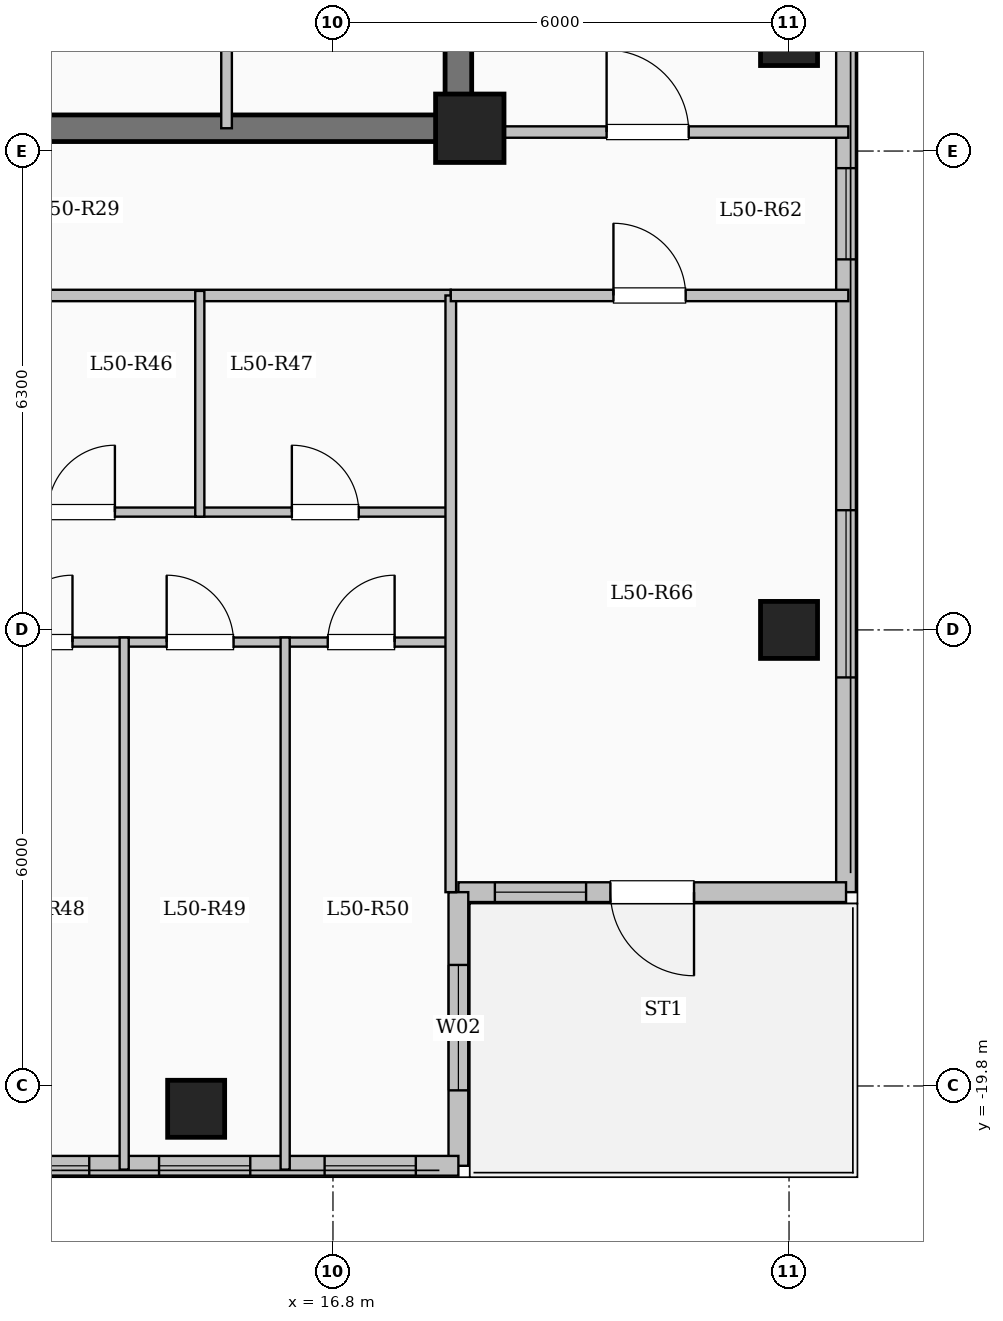
"""IFC4 building model, lengths in metres.
Left out: names, types, materials, properties, quantities, classifications, styles, units other than length and angle.
Written with IfcOpenShell. Run it as: python <this file> out.ifc"""

import sys

from ifc_helpers import new_model, si_unit, direction, frame, frame_2d, origin, origin_2d, place, context, subcontext, project, spatial, rectangle, extrude, element, fill, save


model = new_model("IFC4")
c1 = context("Model", 3, precision=1e-05, world=origin(), true_north=direction((0.0, 1.0)))
c2 = subcontext(c1, "Body", "Model", "MODEL_VIEW")
j1 = project(units=[si_unit("LENGTHUNIT", "METRE"), si_unit("PLANEANGLEUNIT", "RADIAN")], contexts=[c1])
p1 = place(None, origin())
s1 = spatial("IfcSite", under=j1, at=p1, CompositionType="ELEMENT")
p2 = place(p1, origin())
s2 = spatial("IfcBuilding", under=s1, at=p2, CompositionType="ELEMENT")
p3 = place(p2, frame((0.0, 0.0, 186.9)))
s3 = spatial("IfcBuildingStorey", under=s2, at=p3, CompositionType="ELEMENT", Elevation=186.9)
p4 = place(p3, frame((18.6, -7.2, 0.0), z_axis=(0.0, 0.0, 1.0), x_axis=(1.0, 0.0, 0.0)))
e1 = element("IfcColumn", 1, at=p4, inside=s3, PredefinedType="COLUMN", context=c2, shape_type="SweptSolid", body=[
    extrude(rectangle(XDim=0.9, YDim=0.9, at=origin_2d()), origin(), (0.0, 0.0, 1.0), 3.35),
])
for number, where, z_axis, x_axis in (
    (2, (15.0, -20.1, 0.0), (0.0, 0.0, 1.0), (1.0, 0.0, 0.0)),
    (3, (22.8, -13.8, 0.0), (0.0, 0.0, 1.0), (1.0, 0.0, 0.0)),
    (4, (22.8, -6.0, 0.0), (0.0, 0.0, 1.0), (1.0, 0.0, 0.0)),
):
    element("IfcColumn", number, at=place(p3, frame(where, z_axis=z_axis, x_axis=x_axis)), inside=s3, PredefinedType="COLUMN", context=c2, shape_type="SweptSolid", body=[
        extrude(rectangle(XDim=0.75, YDim=0.75, at=origin_2d()), origin(), (0.0, 0.0, 1.0), 3.35),
    ])
p5 = place(p3, frame((23.55, 17.25, 0.0), z_axis=(0.0, 0.0, 1.0), x_axis=(0.0, -1.0, 0.0)))
e5 = element("IfcWall", 5, at=p5, inside=s3, PredefinedType="SOLIDWALL", context=c2, shape_type="SweptSolid", body=[
    extrude(rectangle(XDim=34.5, YDim=0.26, at=frame_2d((17.25, 0.0))), origin(), (0.0, 0.0, 1.0), 3.1),
])
p6 = place(p5, frame((1.375, 0.0, 0.9)))
e6 = element("IfcOpeningElement", 6, at=p6, cuts=e5, PredefinedType="OPENING", context=c2, shape_type="SweptSolid", body=[
    extrude(rectangle(XDim=2.0, YDim=1.7, at=frame_2d((1.0, 0.85))), frame((0.0, 0.14, 0.0), z_axis=(0.0, -1.0, 0.0), x_axis=(1.0, 0.0, 0.0)), (0.0, 0.0, 1.0), 0.28),
])
p7 = place(p5, frame((5.125, 0.0, 0.95)))
e7 = element("IfcOpeningElement", 7, at=p7, cuts=e5, PredefinedType="OPENING", context=c2, shape_type="SweptSolid", body=[
    extrude(rectangle(XDim=1.0, YDim=1.5, at=frame_2d((0.5, 0.75))), frame((0.0, 0.14, 0.0), z_axis=(0.0, -1.0, 0.0), x_axis=(1.0, 0.0, 0.0)), (0.0, 0.0, 1.0), 0.28),
])
p8 = place(p5, frame((14.5, 0.0, 0.9)))
e8 = element("IfcOpeningElement", 8, at=p8, cuts=e5, PredefinedType="OPENING", context=c2, shape_type="SweptSolid", body=[
    extrude(rectangle(XDim=2.0, YDim=1.7, at=frame_2d((1.0, 0.85))), frame((0.0, 0.14, 0.0), z_axis=(0.0, -1.0, 0.0), x_axis=(1.0, 0.0, 0.0)), (0.0, 0.0, 1.0), 0.28),
])
p9 = place(p5, frame((24.975, 0.0, 0.95)))
e9 = element("IfcOpeningElement", 9, at=p9, cuts=e5, PredefinedType="OPENING", context=c2, shape_type="SweptSolid", body=[
    extrude(rectangle(XDim=1.2, YDim=1.5, at=frame_2d((0.6, 0.75))), frame((0.0, 0.14, 0.0), z_axis=(0.0, -1.0, 0.0), x_axis=(1.0, 0.0, 0.0)), (0.0, 0.0, 1.0), 0.28),
])
p10 = place(p5, frame((29.475, 0.0, 0.9)))
e10 = element("IfcOpeningElement", 10, at=p10, cuts=e5, PredefinedType="OPENING", context=c2, shape_type="SweptSolid", body=[
    extrude(rectangle(XDim=2.2, YDim=1.75, at=frame_2d((1.1, 0.875))), frame((0.0, 0.14, 0.0), z_axis=(0.0, -1.0, 0.0), x_axis=(1.0, 0.0, 0.0)), (0.0, 0.0, 1.0), 0.28),
])
p11 = place(p3, frame((23.55, -17.25, 0.0), z_axis=(0.0, 0.0, 1.0), x_axis=(-1.0, 0.0, 0.0)))
e11 = element("IfcWall", 11, at=p11, inside=s3, PredefinedType="SOLIDWALL", context=c2, shape_type="SweptSolid", body=[
    extrude(rectangle(XDim=5.1, YDim=0.26, at=frame_2d((2.55, 0.0))), origin(), (0.0, 0.0, 1.0), 3.1),
])
p12 = place(p11, frame((2.0, 0.0, 0.0)))
e12 = element("IfcOpeningElement", 12, at=p12, cuts=e11, PredefinedType="OPENING", context=c2, shape_type="SweptSolid", body=[
    extrude(rectangle(XDim=1.1, YDim=2.2, at=frame_2d((0.55, 1.1))), frame((0.0, 0.14, 0.0), z_axis=(0.0, -1.0, 0.0), x_axis=(1.0, 0.0, 0.0)), (0.0, 0.0, 1.0), 0.28),
])
p13 = place(p11, frame((3.42, 0.0, 0.95)))
e13 = element("IfcOpeningElement", 13, at=p13, cuts=e11, PredefinedType="OPENING", context=c2, shape_type="SweptSolid", body=[
    extrude(rectangle(XDim=1.2, YDim=1.5, at=frame_2d((0.6, 0.75))), frame((0.0, 0.14, 0.0), z_axis=(0.0, -1.0, 0.0), x_axis=(1.0, 0.0, 0.0)), (0.0, 0.0, 1.0), 0.28),
])
p14 = place(p3, frame((18.45, -17.25, 0.0), z_axis=(0.0, 0.0, 1.0), x_axis=(0.0, -1.0, 0.0)))
e14 = element("IfcWall", 14, at=p14, inside=s3, PredefinedType="SOLIDWALL", context=c2, shape_type="SweptSolid", body=[
    extrude(rectangle(XDim=3.6, YDim=0.26, at=frame_2d((1.8, 0.0))), origin(), (0.0, 0.0, 1.0), 3.1),
])
p15 = place(p14, frame((0.958, 0.0, 0.9)))
e15 = element("IfcOpeningElement", 15, at=p15, cuts=e14, PredefinedType="OPENING", context=c2, shape_type="SweptSolid", body=[
    extrude(rectangle(XDim=1.65, YDim=1.6, at=frame_2d((0.825, 0.8))), frame((0.0, 0.14, 0.0), z_axis=(0.0, -1.0, 0.0), x_axis=(1.0, 0.0, 0.0)), (0.0, 0.0, 1.0), 0.28),
])
p16 = place(p3, frame((18.45, -20.85, 0.0), z_axis=(0.0, 0.0, 1.0), x_axis=(-1.0, 0.0, 0.0)))
e16 = element("IfcWall", 16, at=p16, inside=s3, PredefinedType="SOLIDWALL", context=c2, shape_type="SweptSolid", body=[
    extrude(rectangle(XDim=11.1, YDim=0.26, at=frame_2d((5.55, 0.0))), origin(), (0.0, 0.0, 1.0), 3.1),
])
p17 = place(p16, frame((0.56, 0.0, 0.95)))
e17 = element("IfcOpeningElement", 17, at=p17, cuts=e16, PredefinedType="OPENING", context=c2, shape_type="SweptSolid", body=[
    extrude(rectangle(XDim=1.2, YDim=1.5, at=frame_2d((0.6, 0.75))), frame((0.0, 0.14, 0.0), z_axis=(0.0, -1.0, 0.0), x_axis=(1.0, 0.0, 0.0)), (0.0, 0.0, 1.0), 0.28),
])
p18 = place(p16, frame((2.738, 0.0, 0.95)))
e18 = element("IfcOpeningElement", 18, at=p18, cuts=e16, PredefinedType="OPENING", context=c2, shape_type="SweptSolid", body=[
    extrude(rectangle(XDim=1.2, YDim=1.5, at=frame_2d((0.6, 0.75))), frame((0.0, 0.14, 0.0), z_axis=(0.0, -1.0, 0.0), x_axis=(1.0, 0.0, 0.0)), (0.0, 0.0, 1.0), 0.28),
])
p19 = place(p16, frame((4.856, 0.0, 0.95)))
e19 = element("IfcOpeningElement", 19, at=p19, cuts=e16, PredefinedType="OPENING", context=c2, shape_type="SweptSolid", body=[
    extrude(rectangle(XDim=1.2, YDim=1.5, at=frame_2d((0.6, 0.75))), frame((0.0, 0.14, 0.0), z_axis=(0.0, -1.0, 0.0), x_axis=(1.0, 0.0, 0.0)), (0.0, 0.0, 1.0), 0.28),
])
p20 = place(p16, frame((7.362, 0.0, 0.9)))
e20 = element("IfcOpeningElement", 20, at=p20, cuts=e16, PredefinedType="OPENING", context=c2, shape_type="SweptSolid", body=[
    extrude(rectangle(XDim=1.65, YDim=1.6, at=frame_2d((0.825, 0.8))), frame((0.0, 0.14, 0.0), z_axis=(0.0, -1.0, 0.0), x_axis=(1.0, 0.0, 0.0)), (0.0, 0.0, 1.0), 0.28),
])
p21 = place(p16, frame((10.103, 0.0, 0.95)))
e21 = element("IfcOpeningElement", 21, at=p21, cuts=e16, PredefinedType="OPENING", context=c2, shape_type="SweptSolid", body=[
    extrude(rectangle(XDim=0.85, YDim=1.5, at=frame_2d((0.425, 0.75))), frame((0.0, 0.14, 0.0), z_axis=(0.0, -1.0, 0.0), x_axis=(1.0, 0.0, 0.0)), (0.0, 0.0, 1.0), 0.28),
])
p22 = place(p3, frame((18.45, -7.375, 0.0), z_axis=(0.0, 0.0, 1.0), x_axis=(0.0, 1.0, 0.0)))
e22 = element("IfcWall", 22, at=p22, inside=s3, PredefinedType="SHEAR", context=c2, shape_type="SweptSolid", body=[
    extrude(rectangle(XDim=14.05, YDim=0.35, at=frame_2d((7.025, 0.0))), origin(), (0.0, 0.0, 1.0), 3.35),
])
p23 = place(p3, frame((12.625, -7.2, 0.0), z_axis=(0.0, 0.0, 1.0), x_axis=(1.0, 0.0, 0.0)))
e23 = element("IfcWall", 23, at=p23, inside=s3, PredefinedType="SHEAR", context=c2, shape_type="SweptSolid", body=[
    extrude(rectangle(XDim=6.0, YDim=0.35, at=frame_2d((3.0, 0.0))), origin(), (0.0, 0.0, 1.0), 3.35),
])
p24 = place(p3, frame((15.4, -7.2, 0.0), z_axis=(0.0, 0.0, 1.0), x_axis=(0.0, 1.0, 0.0)))
e24 = element("IfcWall", 24, at=p24, inside=s3, PredefinedType="PARTITIONING", context=c2, shape_type="SweptSolid", body=[
    extrude(rectangle(XDim=10.45, YDim=0.14, at=frame_2d((5.225, 0.0))), origin(), (0.0, 0.0, 1.0), 3.1),
])
p25 = place(p24, frame((9.25, 0.0, 0.0)))
e25 = element("IfcOpeningElement", 25, at=p25, cuts=e24, PredefinedType="OPENING", context=c2, shape_type="SweptSolid", body=[
    extrude(rectangle(XDim=0.9, YDim=2.08, at=frame_2d((0.45, 1.04))), frame((0.0, 0.08, 0.0), z_axis=(0.0, -1.0, 0.0), x_axis=(1.0, 0.0, 0.0)), (0.0, 0.0, 1.0), 0.16),
])
p26 = place(p3, frame((8.55, -9.4, 0.0), z_axis=(0.0, 0.0, 1.0), x_axis=(1.0, 0.0, 0.0)))
e26 = element("IfcWall", 26, at=p26, inside=s3, PredefinedType="PARTITIONING", context=c2, shape_type="SweptSolid", body=[
    extrude(rectangle(XDim=9.8, YDim=0.15, at=frame_2d((4.9, 0.0))), origin(), (0.0, 0.0, 1.0), 3.1),
])
p27 = place(p26, frame((0.9, 0.0, 0.0)))
e27 = element("IfcOpeningElement", 27, at=p27, cuts=e26, PredefinedType="OPENING", context=c2, shape_type="SweptSolid", body=[
    extrude(rectangle(XDim=0.96, YDim=2.15, at=frame_2d((0.48, 1.075))), frame((0.0, 0.085, 0.0), z_axis=(0.0, -1.0, 0.0), x_axis=(1.0, 0.0, 0.0)), (0.0, 0.0, 1.0), 0.17),
])
p28 = place(p3, frame((11.934, -12.25, 0.0), z_axis=(0.0, 0.0, 1.0), x_axis=(1.0, 0.0, 0.0)))
e28 = element("IfcWall", 28, at=p28, inside=s3, PredefinedType="PARTITIONING", context=c2, shape_type="SweptSolid", body=[
    extrude(rectangle(XDim=3.114, YDim=0.12, at=frame_2d((1.557, 0.0))), origin(), (0.0, 0.0, 1.0), 2.725),
])
p29 = place(p28, frame((1.117, 0.0, 0.0)))
e29 = element("IfcOpeningElement", 29, at=p29, cuts=e28, PredefinedType="OPENING", context=c2, shape_type="SweptSolid", body=[
    extrude(rectangle(XDim=0.88, YDim=2.1, at=frame_2d((0.44, 1.05))), frame((0.0, 0.07, 0.0), z_axis=(0.0, -1.0, 0.0), x_axis=(1.0, 0.0, 0.0)), (0.0, 0.0, 1.0), 0.14),
])
p30 = place(p3, frame((15.048, -12.25, 0.0), z_axis=(0.0, 0.0, 1.0), x_axis=(1.0, 0.0, 0.0)))
e30 = element("IfcWall", 30, at=p30, inside=s3, PredefinedType="PARTITIONING", context=c2, shape_type="SweptSolid", body=[
    extrude(rectangle(XDim=3.302, YDim=0.12, at=frame_2d((1.651, 0.0))), origin(), (0.0, 0.0, 1.0), 3.1),
])
p31 = place(p30, frame((1.211, 0.0, 0.0)))
e31 = element("IfcOpeningElement", 31, at=p31, cuts=e30, PredefinedType="OPENING", context=c2, shape_type="SweptSolid", body=[
    extrude(rectangle(XDim=0.88, YDim=2.1, at=frame_2d((0.44, 1.05))), frame((0.0, 0.07, 0.0), z_axis=(0.0, -1.0, 0.0), x_axis=(1.0, 0.0, 0.0)), (0.0, 0.0, 1.0), 0.14),
])
p32 = place(p3, frame((11.874, -13.96, 0.0), z_axis=(0.0, 0.0, 1.0), x_axis=(1.0, 0.0, 0.0)))
e32 = element("IfcWall", 32, at=p32, inside=s3, PredefinedType="PARTITIONING", context=c2, shape_type="SweptSolid", body=[
    extrude(rectangle(XDim=6.536, YDim=0.12, at=frame_2d((3.268, 0.0))), origin(), (0.0, 0.0, 1.0), 2.725),
])
p33 = place(p32, frame((0.619, 0.0, 0.0)))
e33 = element("IfcOpeningElement", 33, at=p33, cuts=e32, PredefinedType="OPENING", context=c2, shape_type="SweptSolid", body=[
    extrude(rectangle(XDim=0.88, YDim=2.1, at=frame_2d((0.44, 1.05))), frame((0.0, 0.07, 0.0), z_axis=(0.0, -1.0, 0.0), x_axis=(1.0, 0.0, 0.0)), (0.0, 0.0, 1.0), 0.14),
])
p34 = place(p32, frame((2.738, 0.0, 0.0)))
e34 = element("IfcOpeningElement", 34, at=p34, cuts=e32, PredefinedType="OPENING", context=c2, shape_type="SweptSolid", body=[
    extrude(rectangle(XDim=0.88, YDim=2.1, at=frame_2d((0.44, 1.05))), frame((0.0, 0.07, 0.0), z_axis=(0.0, -1.0, 0.0), x_axis=(1.0, 0.0, 0.0)), (0.0, 0.0, 1.0), 0.14),
])
p35 = place(p32, frame((4.857, 0.0, 0.0)))
e35 = element("IfcOpeningElement", 35, at=p35, cuts=e32, PredefinedType="OPENING", context=c2, shape_type="SweptSolid", body=[
    extrude(rectangle(XDim=0.88, YDim=2.1, at=frame_2d((0.44, 1.05))), frame((0.0, 0.07, 0.0), z_axis=(0.0, -1.0, 0.0), x_axis=(1.0, 0.0, 0.0)), (0.0, 0.0, 1.0), 0.14),
])
p36 = place(p3, frame((15.048, -12.31, 0.0), z_axis=(0.0, 0.0, 1.0), x_axis=(0.0, 1.0, 0.0)))
e36 = element("IfcWall", 36, at=p36, inside=s3, PredefinedType="PARTITIONING", context=c2, shape_type="SweptSolid", body=[
    extrude(rectangle(XDim=2.97, YDim=0.12, at=frame_2d((1.485, 0.0))), origin(), (0.0, 0.0, 1.0), 2.585),
])
for number, where, z_axis, x_axis in (
    (37, (14.053, -20.9, 0.0), (0.0, 0.0, 1.0), (0.0, 1.0, 0.0)),
    (38, (16.171, -20.9, 0.0), (0.0, 0.0, 1.0), (0.0, 1.0, 0.0)),
):
    element("IfcWall", number, at=place(p3, frame(where, z_axis=z_axis, x_axis=x_axis)), inside=s3, PredefinedType="PARTITIONING", context=c2, shape_type="SweptSolid", body=[
        extrude(rectangle(XDim=7.0, YDim=0.12, at=frame_2d((3.5, 0.0))), origin(), (0.0, 0.0, 1.0), 3.1),
    ])
p37 = place(p3, frame((18.45, -7.25, 0.0), z_axis=(0.0, 0.0, 1.0), x_axis=(1.0, 0.0, 0.0)))
e39 = element("IfcWall", 39, at=p37, inside=s3, PredefinedType="PARTITIONING", context=c2, shape_type="SweptSolid", body=[
    extrude(rectangle(XDim=5.13, YDim=0.15, at=frame_2d((2.565, 0.0))), origin(), (0.0, 0.0, 1.0), 3.1),
])
p38 = place(p37, frame((1.95, 0.0, 0.0)))
e40 = element("IfcOpeningElement", 40, at=p38, cuts=e39, PredefinedType="OPENING", context=c2, shape_type="SweptSolid", body=[
    extrude(rectangle(XDim=1.08, YDim=2.15, at=frame_2d((0.54, 1.075))), frame((0.0, 0.085, 0.0), z_axis=(0.0, -1.0, 0.0), x_axis=(1.0, 0.0, 0.0)), (0.0, 0.0, 1.0), 0.17),
])
p39 = place(p3, frame((18.35, -17.25, 0.0), z_axis=(0.0, 0.0, 1.0), x_axis=(0.0, 1.0, 0.0)))
e41 = element("IfcWall", 41, at=p39, inside=s3, PredefinedType="PARTITIONING", context=c2, shape_type="SweptSolid", body=[
    extrude(rectangle(XDim=7.85, YDim=0.14, at=frame_2d((3.925, 0.0))), origin(), (0.0, 0.0, 1.0), 3.1),
])
p40 = place(p3, frame((18.35, -9.4, 0.0), z_axis=(0.0, 0.0, 1.0), x_axis=(1.0, 0.0, 0.0)))
e42 = element("IfcWall", 42, at=p40, inside=s3, PredefinedType="PARTITIONING", context=c2, shape_type="SweptSolid", body=[
    extrude(rectangle(XDim=5.23, YDim=0.15, at=frame_2d((2.615, 0.0))), origin(), (0.0, 0.0, 1.0), 3.1),
])
p41 = place(p40, frame((2.14, 0.0, 0.0)))
e43 = element("IfcOpeningElement", 43, at=p41, cuts=e42, PredefinedType="OPENING", context=c2, shape_type="SweptSolid", body=[
    extrude(rectangle(XDim=0.95, YDim=2.15, at=frame_2d((0.475, 1.075))), frame((0.0, 0.085, 0.0), z_axis=(0.0, -1.0, 0.0), x_axis=(1.0, 0.0, 0.0)), (0.0, 0.0, 1.0), 0.17),
])
p42 = place(p9, origin())
e44 = element("IfcWindow", 44, at=p42, inside=s3, PartitioningType="SINGLE_PANEL", PredefinedType="WINDOW", context=c2, shape_type="SweptSolid", body=[
    extrude(rectangle(XDim=1.2, YDim=1.5, at=frame_2d((0.6, 0.75))), frame((0.0, 0.03, 0.0), z_axis=(0.0, -1.0, 0.0), x_axis=(1.0, 0.0, 0.0)), (0.0, 0.0, 1.0), 0.06),
])
fill(e9, e44)
p43 = place(p10, origin())
e45 = element("IfcWindow", 45, at=p43, inside=s3, PartitioningType="SINGLE_PANEL", PredefinedType="WINDOW", context=c2, shape_type="SweptSolid", body=[
    extrude(rectangle(XDim=2.2, YDim=1.75, at=frame_2d((1.1, 0.875))), frame((0.0, 0.03, 0.0), z_axis=(0.0, -1.0, 0.0), x_axis=(1.0, 0.0, 0.0)), (0.0, 0.0, 1.0), 0.06),
])
fill(e10, e45)
p44 = place(p12, origin())
e46 = element("IfcDoor", 46, at=p44, inside=s3, OperationType="SINGLE_SWING_LEFT", PredefinedType="DOOR", context=c2, shape_type="SweptSolid", body=[
    extrude(rectangle(XDim=1.1, YDim=2.2, at=frame_2d((0.55, 1.1))), frame((0.0, 0.025, 0.0), z_axis=(0.0, -1.0, 0.0), x_axis=(1.0, 0.0, 0.0)), (0.0, 0.0, 1.0), 0.05),
])
fill(e12, e46)
p45 = place(p13, origin())
e47 = element("IfcWindow", 47, at=p45, inside=s3, PartitioningType="SINGLE_PANEL", PredefinedType="WINDOW", context=c2, shape_type="SweptSolid", body=[
    extrude(rectangle(XDim=1.2, YDim=1.5, at=frame_2d((0.6, 0.75))), frame((0.0, 0.03, 0.0), z_axis=(0.0, -1.0, 0.0), x_axis=(1.0, 0.0, 0.0)), (0.0, 0.0, 1.0), 0.06),
])
fill(e13, e47)
p46 = place(p15, origin())
e48 = element("IfcWindow", 48, at=p46, inside=s3, PartitioningType="SINGLE_PANEL", PredefinedType="WINDOW", context=c2, shape_type="SweptSolid", body=[
    extrude(rectangle(XDim=1.65, YDim=1.6, at=frame_2d((0.825, 0.8))), frame((0.0, 0.03, 0.0), z_axis=(0.0, -1.0, 0.0), x_axis=(1.0, 0.0, 0.0)), (0.0, 0.0, 1.0), 0.06),
])
fill(e15, e48)
p47 = place(p17, origin())
e49 = element("IfcWindow", 49, at=p47, inside=s3, PartitioningType="SINGLE_PANEL", PredefinedType="WINDOW", context=c2, shape_type="SweptSolid", body=[
    extrude(rectangle(XDim=1.2, YDim=1.5, at=frame_2d((0.6, 0.75))), frame((0.0, 0.03, 0.0), z_axis=(0.0, -1.0, 0.0), x_axis=(1.0, 0.0, 0.0)), (0.0, 0.0, 1.0), 0.06),
])
fill(e17, e49)
p48 = place(p18, origin())
e50 = element("IfcWindow", 50, at=p48, inside=s3, PartitioningType="SINGLE_PANEL", PredefinedType="WINDOW", context=c2, shape_type="SweptSolid", body=[
    extrude(rectangle(XDim=1.2, YDim=1.5, at=frame_2d((0.6, 0.75))), frame((0.0, 0.03, 0.0), z_axis=(0.0, -1.0, 0.0), x_axis=(1.0, 0.0, 0.0)), (0.0, 0.0, 1.0), 0.06),
])
fill(e18, e50)
p49 = place(p19, origin())
e51 = element("IfcWindow", 51, at=p49, inside=s3, PartitioningType="SINGLE_PANEL", PredefinedType="WINDOW", context=c2, shape_type="SweptSolid", body=[
    extrude(rectangle(XDim=1.2, YDim=1.5, at=frame_2d((0.6, 0.75))), frame((0.0, 0.03, 0.0), z_axis=(0.0, -1.0, 0.0), x_axis=(1.0, 0.0, 0.0)), (0.0, 0.0, 1.0), 0.06),
])
fill(e19, e51)
p50 = place(p29, origin())
e52 = element("IfcDoor", 52, at=p50, inside=s3, OperationType="SINGLE_SWING_RIGHT", PredefinedType="DOOR", context=c2, shape_type="SweptSolid", body=[
    extrude(rectangle(XDim=0.88, YDim=2.1, at=frame_2d((0.44, 1.05))), frame((0.0, 0.025, 0.0), z_axis=(0.0, -1.0, 0.0), x_axis=(1.0, 0.0, 0.0)), (0.0, 0.0, 1.0), 0.05),
])
fill(e29, e52)
p51 = place(p31, origin())
e53 = element("IfcDoor", 53, at=p51, inside=s3, OperationType="SINGLE_SWING_LEFT", PredefinedType="DOOR", context=c2, shape_type="SweptSolid", body=[
    extrude(rectangle(XDim=0.88, YDim=2.1, at=frame_2d((0.44, 1.05))), frame((0.0, 0.025, 0.0), z_axis=(0.0, -1.0, 0.0), x_axis=(1.0, 0.0, 0.0)), (0.0, 0.0, 1.0), 0.05),
])
fill(e31, e53)
p52 = place(p33, origin())
e54 = element("IfcDoor", 54, at=p52, inside=s3, OperationType="SINGLE_SWING_RIGHT", PredefinedType="DOOR", context=c2, shape_type="SweptSolid", body=[
    extrude(rectangle(XDim=0.88, YDim=2.1, at=frame_2d((0.44, 1.05))), frame((0.0, 0.025, 0.0), z_axis=(0.0, -1.0, 0.0), x_axis=(1.0, 0.0, 0.0)), (0.0, 0.0, 1.0), 0.05),
])
fill(e33, e54)
p53 = place(p34, origin())
e55 = element("IfcDoor", 55, at=p53, inside=s3, OperationType="SINGLE_SWING_LEFT", PredefinedType="DOOR", context=c2, shape_type="SweptSolid", body=[
    extrude(rectangle(XDim=0.88, YDim=2.1, at=frame_2d((0.44, 1.05))), frame((0.0, 0.025, 0.0), z_axis=(0.0, -1.0, 0.0), x_axis=(1.0, 0.0, 0.0)), (0.0, 0.0, 1.0), 0.05),
])
fill(e34, e55)
p54 = place(p35, origin())
e56 = element("IfcDoor", 56, at=p54, inside=s3, OperationType="SINGLE_SWING_RIGHT", PredefinedType="DOOR", context=c2, shape_type="SweptSolid", body=[
    extrude(rectangle(XDim=0.88, YDim=2.1, at=frame_2d((0.44, 1.05))), frame((0.0, 0.025, 0.0), z_axis=(0.0, -1.0, 0.0), x_axis=(1.0, 0.0, 0.0)), (0.0, 0.0, 1.0), 0.05),
])
fill(e35, e56)
p55 = place(p41, origin())
e57 = element("IfcDoor", 57, at=p55, inside=s3, OperationType="SINGLE_SWING_LEFT", PredefinedType="DOOR", context=c2, shape_type="SweptSolid", body=[
    extrude(rectangle(XDim=0.95, YDim=2.15, at=frame_2d((0.475, 1.075))), frame((0.0, 0.025, 0.0), z_axis=(0.0, -1.0, 0.0), x_axis=(1.0, 0.0, 0.0)), (0.0, 0.0, 1.0), 0.05),
])
fill(e43, e57)
p56 = place(p38, origin())
e58 = element("IfcDoor", 58, at=p56, inside=s3, OperationType="SINGLE_SWING_LEFT", PredefinedType="DOOR", context=c2, shape_type="SweptSolid", body=[
    extrude(rectangle(XDim=1.08, YDim=2.15, at=frame_2d((0.54, 1.075))), frame((0.0, 0.025, 0.0), z_axis=(0.0, -1.0, 0.0), x_axis=(1.0, 0.0, 0.0)), (0.0, 0.0, 1.0), 0.05),
])
fill(e40, e58)
save(model, sys.argv[1])
